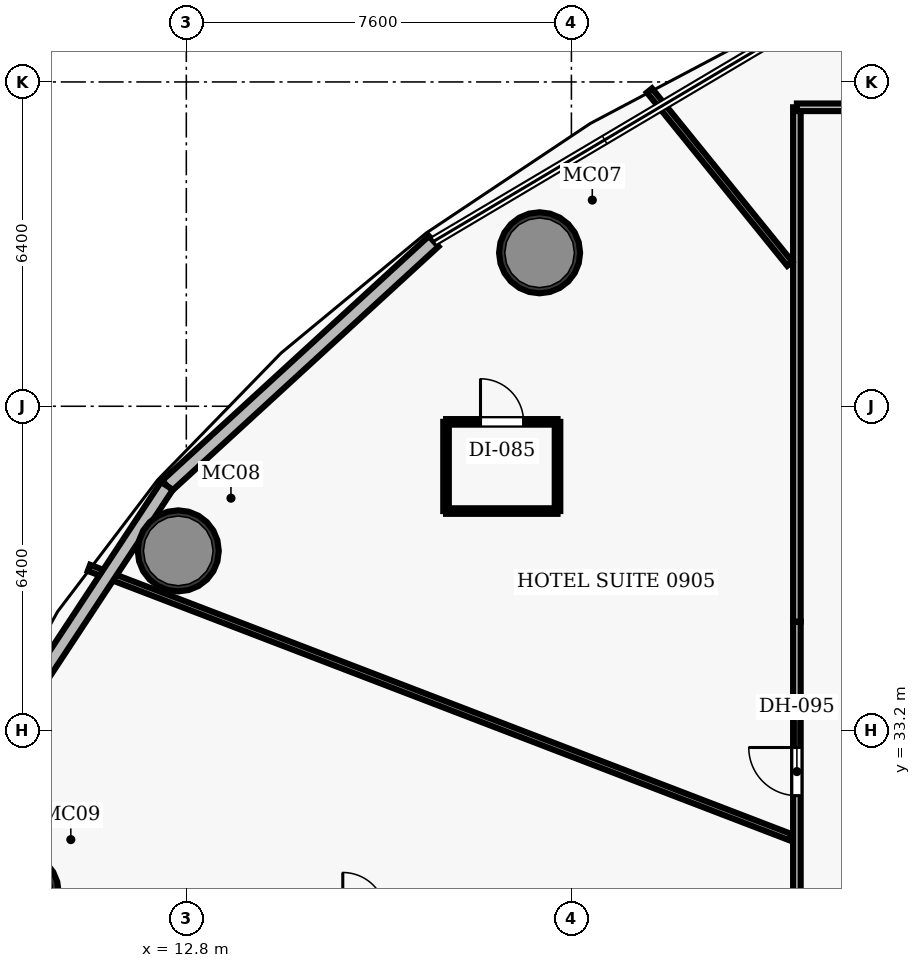
"""IFC4 building model, lengths in metres.
Left out: names, types, materials, properties, quantities, classifications, styles, units other than length and angle.
Written with IfcOpenShell. Run it as: python <this file> out.ifc"""

import sys

from ifc_helpers import new_model, si_unit, direction, frame, frame_2d, origin, origin_2d, place, context, subcontext, project, spatial, rectangle, hollow_circle, extrude, element, fill, save


model = new_model("IFC4")
c1 = context("Model", 3, precision=1e-05, world=origin(), true_north=direction((0.0, 1.0)))
c2 = subcontext(c1, "Body", "Model", "MODEL_VIEW")
j1 = project(units=[si_unit("LENGTHUNIT", "METRE"), si_unit("PLANEANGLEUNIT", "RADIAN")], contexts=[c1])
p1 = place(None, origin())
s1 = spatial("IfcSite", under=j1, at=p1, CompositionType="ELEMENT")
p2 = place(p1, origin())
s2 = spatial("IfcBuilding", under=s1, at=p2, CompositionType="ELEMENT")
p3 = place(p2, frame((0.0, 0.0, 48.4)))
s3 = spatial("IfcBuildingStorey", under=s2, at=p3, CompositionType="ELEMENT", Elevation=48.4)
for number, where, z_axis, x_axis in (
    (1, (19.772, 42.629, 0.0), (0.0, 0.0, 1.0), (1.0, 0.0, 0.0)),
    (2, (12.641, 36.746, 0.0), (0.0, 0.0, 1.0), (1.0, 0.0, 0.0)),
    (3, (9.48, 30.008, 0.0), (0.0, 0.0, 1.0), (1.0, 0.0, 0.0)),
):
    element("IfcColumn", number, at=place(p3, frame(where, z_axis=z_axis, x_axis=x_axis)), inside=s3, PredefinedType="COLUMN", context=c2, shape_type="SweptSolid", body=[
        extrude(hollow_circle(Radius=0.8, WallThickness=0.06, at=origin_2d()), origin(), (0.0, 0.0, 1.0), 3.5),
    ])
p4 = place(p3, frame((24.85, 19.45, 0.0), z_axis=(0.0, 0.0, 1.0), x_axis=(0.0, 1.0, 0.0)))
e4 = element("IfcWall", 4, at=p4, inside=s3, PredefinedType="PARTITIONING", context=c2, shape_type="SweptSolid", body=[
    extrude(rectangle(XDim=15.9, YDim=0.15, at=frame_2d((7.95, 0.0))), origin(), (0.0, 0.0, 1.0), 2.6),
])
p5 = place(p4, frame((12.466, 0.0, 0.0)))
e5 = element("IfcOpeningElement", 5, at=p5, cuts=e4, PredefinedType="OPENING", context=c2, shape_type="SweptSolid", body=[
    extrude(rectangle(XDim=0.95, YDim=2.15, at=frame_2d((0.475, 1.075))), frame((0.0, 0.085, 0.0), z_axis=(0.0, -1.0, 0.0), x_axis=(1.0, 0.0, 0.0)), (0.0, 0.0, 1.0), 0.17),
])
p6 = place(p4, frame((7.571, 0.0, 0.0)))
e6 = element("IfcOpeningElement", 6, at=p6, cuts=e4, PredefinedType="OPENING", context=c2, shape_type="SweptSolid", body=[
    extrude(rectangle(XDim=0.95, YDim=2.15, at=frame_2d((0.475, 1.075))), frame((0.0, 0.085, 0.0), z_axis=(0.0, -1.0, 0.0), x_axis=(1.0, 0.0, 0.0)), (0.0, 0.0, 1.0), 0.17),
])
p7 = place(p4, frame((2.609, 0.0, 0.0)))
e7 = element("IfcOpeningElement", 7, at=p7, cuts=e4, PredefinedType="OPENING", context=c2, shape_type="SweptSolid", body=[
    extrude(rectangle(XDim=0.95, YDim=2.15, at=frame_2d((0.475, 1.075))), frame((0.0, 0.085, 0.0), z_axis=(0.0, -1.0, 0.0), x_axis=(1.0, 0.0, 0.0)), (0.0, 0.0, 1.0), 0.17),
])
p8 = place(p3, frame((24.85, 35.35, 0.0), z_axis=(0.0, 0.0, 1.0), x_axis=(0.0, 1.0, 0.0)))
e8 = element("IfcWall", 8, at=p8, inside=s3, PredefinedType="PARTITIONING", context=c2, shape_type="SweptSolid", body=[
    extrude(rectangle(XDim=10.15, YDim=0.15, at=frame_2d((5.075, 0.0))), origin(), (0.0, 0.0, 1.0), 2.6),
])
p9 = place(p3, frame((24.85, 45.5, 0.0), z_axis=(0.0, 0.0, 1.0), x_axis=(1.0, 0.0, 0.0)))
e9 = element("IfcWall", 9, at=p9, inside=s3, PredefinedType="PARTITIONING", context=c2, shape_type="SweptSolid", body=[
    extrude(rectangle(XDim=2.8, YDim=0.15, at=frame_2d((1.4, 0.0))), origin(), (0.0, 0.0, 1.0), 2.6),
])
p10 = place(p3, frame((24.71, 42.412, 0.0), z_axis=(0.0, 0.0, 1.0), x_axis=(-0.629345031815, 0.777126007112, 0.0)))
e10 = element("IfcWall", 10, at=p10, inside=s3, PredefinedType="PARTITIONING", context=c2, shape_type="SweptSolid", body=[
    extrude(rectangle(XDim=4.401, YDim=0.13, at=frame_2d((2.201, 0.0))), origin(), (0.0, 0.0, 1.0), 2.6),
])
p11 = place(p3, frame((24.71, 31.102, 0.0), z_axis=(0.0, 0.0, 1.0), x_axis=(-0.933582813914, 0.358361730049, 0.0)))
e11 = element("IfcWall", 11, at=p11, inside=s3, PredefinedType="PARTITIONING", context=c2, shape_type="SweptSolid", body=[
    extrude(rectangle(XDim=14.815, YDim=0.13, at=frame_2d((7.408, 0.0))), origin(), (0.0, 0.0, 1.0), 2.6),
])
p12 = place(p3, frame((17.926, 37.532, 0.0), z_axis=(0.0, 0.0, 1.0), x_axis=(1.0, 0.0, 0.0)))
e12 = element("IfcWall", 12, at=p12, inside=s3, PredefinedType="PARTITIONING", context=c2, shape_type="SweptSolid", body=[
    extrude(rectangle(XDim=2.2, YDim=0.11, at=frame_2d((1.1, 0.0))), origin(), (0.0, 0.0, 1.0), 2.6),
])
p13 = place(p3, frame((17.926, 39.292, 0.0), z_axis=(0.0, 0.0, 1.0), x_axis=(1.0, 0.0, 0.0)))
e13 = element("IfcWall", 13, at=p13, inside=s3, PredefinedType="PARTITIONING", context=c2, shape_type="SweptSolid", body=[
    extrude(rectangle(XDim=2.2, YDim=0.11, at=frame_2d((1.1, 0.0))), origin(), (0.0, 0.0, 1.0), 2.6),
])
p14 = place(p13, frame((0.68, 0.0, 0.0)))
e14 = element("IfcOpeningElement", 14, at=p14, cuts=e13, PredefinedType="OPENING", context=c2, shape_type="SweptSolid", body=[
    extrude(rectangle(XDim=0.85, YDim=2.1, at=frame_2d((0.425, 1.05))), frame((0.0, 0.065, 0.0), z_axis=(0.0, -1.0, 0.0), x_axis=(1.0, 0.0, 0.0)), (0.0, 0.0, 1.0), 0.13),
])
for number, where, z_axis, x_axis in (
    (15, (17.926, 37.532, 0.0), (0.0, 0.0, 1.0), (0.0, 1.0, 0.0)),
    (16, (20.126, 37.532, 0.0), (0.0, 0.0, 1.0), (0.0, 1.0, 0.0)),
):
    element("IfcWall", number, at=place(p3, frame(where, z_axis=z_axis, x_axis=x_axis)), inside=s3, PredefinedType="PARTITIONING", context=c2, shape_type="SweptSolid", body=[
        extrude(rectangle(XDim=1.76, YDim=0.11, at=frame_2d((0.88, 0.0))), origin(), (0.0, 0.0, 1.0), 2.6),
    ])
p15 = place(p3, frame((12.417, 38.029, 0.0), z_axis=(0.0, 0.0, 1.0), x_axis=(0.73711725093, 0.675764869153, 0.0)))
e17 = element("IfcWall", 17, at=p15, inside=s3, PredefinedType="SOLIDWALL", context=c2, shape_type="SweptSolid", body=[
    extrude(rectangle(XDim=7.143, YDim=0.28, at=frame_2d((3.571, 0.0))), origin(), (0.0, 0.0, 1.0), 3.25),
])
p16 = place(p3, frame((9.0, 32.841, 0.0), z_axis=(0.0, 0.0, 1.0), x_axis=(0.550048067435, 0.835132997499, 0.0)))
e18 = element("IfcWall", 18, at=p16, inside=s3, PredefinedType="SOLIDWALL", context=c2, shape_type="SweptSolid", body=[
    extrude(rectangle(XDim=6.212, YDim=0.28, at=frame_2d((3.106, 0.0))), origin(), (0.0, 0.0, 1.0), 3.25),
])
p17 = place(p5, origin())
e19 = element("IfcDoor", 19, at=p17, inside=s3, OperationType="SINGLE_SWING_RIGHT", PredefinedType="DOOR", context=c2, shape_type="SweptSolid", body=[
    extrude(rectangle(XDim=0.95, YDim=2.15, at=frame_2d((0.475, 1.075))), frame((0.0, 0.025, 0.0), z_axis=(0.0, -1.0, 0.0), x_axis=(1.0, 0.0, 0.0)), (0.0, 0.0, 1.0), 0.05),
])
fill(e5, e19)
p18 = place(p14, origin())
e20 = element("IfcDoor", 20, at=p18, inside=s3, OperationType="SINGLE_SWING_LEFT", PredefinedType="DOOR", context=c2, shape_type="SweptSolid", body=[
    extrude(rectangle(XDim=0.85, YDim=2.1, at=frame_2d((0.425, 1.05))), frame((0.0, 0.025, 0.0), z_axis=(0.0, -1.0, 0.0), x_axis=(1.0, 0.0, 0.0)), (0.0, 0.0, 1.0), 0.05),
])
fill(e14, e20)
save(model, sys.argv[1])
